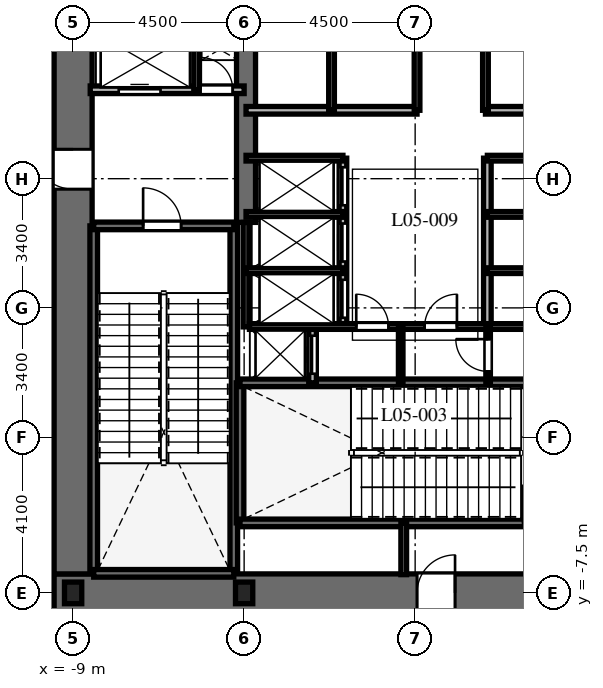
"""IFC4 building model, lengths in metres.
Left out: names, types, materials, properties, quantities, classifications, styles, units other than length and angle.
Written with IfcOpenShell. Run it as: python <this file> out.ifc"""

import sys

from ifc_helpers import new_model, si_unit, direction, frame, frame_2d, origin, origin_2d, place, context, subcontext, project, spatial, rectangle, i_section, extrude, element, fill, save


model = new_model("IFC4")
c1 = context("Model", 3, precision=1e-05, world=origin(), true_north=direction((0.0, 1.0)))
c2 = subcontext(c1, "Body", "Model", "MODEL_VIEW")
j1 = project(units=[si_unit("LENGTHUNIT", "METRE"), si_unit("PLANEANGLEUNIT", "RADIAN")], contexts=[c1])
p1 = place(None, origin())
s1 = spatial("IfcSite", under=j1, at=p1, CompositionType="ELEMENT")
p2 = place(p1, origin())
s2 = spatial("IfcBuilding", under=s1, at=p2, CompositionType="ELEMENT")
p3 = place(p2, frame((0.0, 0.0, 28.2)))
s3 = spatial("IfcBuildingStorey", under=s2, at=p3, CompositionType="ELEMENT", Elevation=28.2)
p4 = place(p3, frame((-9.5, -7.5, 0.0), z_axis=(0.0, 0.0, 1.0), x_axis=(1.0, 0.0, 0.0)))
e1 = element("IfcWall", 1, at=p4, inside=s3, PredefinedType="SHEAR", context=c2, shape_type="SweptSolid", body=[
    extrude(rectangle(XDim=19.0, YDim=1.0, at=frame_2d((9.5, 0.0))), origin(), (0.0, 0.0, 1.0), 6.0),
])
p5 = place(p4, frame((9.55, 0.0, 0.0)))
e2 = element("IfcOpeningElement", 2, at=p5, cuts=e1, PredefinedType="OPENING", context=c2, shape_type="SweptSolid", body=[
    extrude(rectangle(XDim=1.0, YDim=2.15, at=frame_2d((0.5, 1.075))), frame((0.0, 0.51, 0.0), z_axis=(0.0, -1.0, 0.0), x_axis=(1.0, 0.0, 0.0)), (0.0, 0.0, 1.0), 1.02),
])
p6 = place(p3, frame((-9.0, -7.0, 0.0), z_axis=(0.0, 0.0, 1.0), x_axis=(0.0, 1.0, 0.0)))
e3 = element("IfcWall", 3, at=p6, inside=s3, PredefinedType="SHEAR", context=c2, shape_type="SweptSolid", body=[
    extrude(rectangle(XDim=14.0, YDim=1.0, at=frame_2d((7.0, 0.0))), origin(), (0.0, 0.0, 1.0), 6.0),
])
p7 = place(p6, frame((10.125, 0.0, 0.0)))
e4 = element("IfcOpeningElement", 4, at=p7, cuts=e3, PredefinedType="OPENING", context=c2, shape_type="SweptSolid", body=[
    extrude(rectangle(XDim=1.05, YDim=2.15, at=frame_2d((0.525, 1.075))), frame((0.0, 0.51, 0.0), z_axis=(0.0, -1.0, 0.0), x_axis=(1.0, 0.0, 0.0)), (0.0, 0.0, 1.0), 1.02),
])
p8 = place(p3, frame((-4.45, 2.25, 0.0), z_axis=(0.0, 0.0, 1.0), x_axis=(0.0, 1.0, 0.0)))
e5 = element("IfcWall", 5, at=p8, inside=s3, PredefinedType="SHEAR", context=c2, shape_type="SweptSolid", body=[
    extrude(rectangle(XDim=4.75, YDim=0.5, at=frame_2d((2.375, 0.0))), origin(), (0.0, 0.0, 1.0), 6.0),
])
for number, where, z_axis, x_axis in (
    (6, (-8.458, -6.985, 0.0), (0.0, 0.0, 1.0), (0.0, 1.0, 0.0)),
    (7, (-4.772, -6.985, 0.0), (0.0, 0.0, 1.0), (0.0, 1.0, 0.0)),
):
    element("IfcWall", number, at=place(p3, frame(where, z_axis=z_axis, x_axis=x_axis)), inside=s3, PredefinedType="SHEAR", context=c2, shape_type="SweptSolid", body=[
        extrude(rectangle(XDim=9.143, YDim=0.2, at=frame_2d((4.572, 0.0))), origin(), (0.0, 0.0, 1.0), 6.0),
    ])
p9 = place(p3, frame((-8.458, -6.985, 0.0), z_axis=(0.0, 0.0, 1.0), x_axis=(1.0, 0.0, 0.0)))
e8 = element("IfcWall", 8, at=p9, inside=s3, PredefinedType="SHEAR", context=c2, shape_type="SweptSolid", body=[
    extrude(rectangle(XDim=3.686, YDim=0.2, at=frame_2d((1.843, 0.0))), origin(), (0.0, 0.0, 1.0), 6.0),
])
p10 = place(p3, frame((-8.458, 2.158, 0.0), z_axis=(0.0, 0.0, 1.0), x_axis=(1.0, 0.0, 0.0)))
e9 = element("IfcWall", 9, at=p10, inside=s3, PredefinedType="SHEAR", context=c2, shape_type="SweptSolid", body=[
    extrude(rectangle(XDim=3.686, YDim=0.2, at=frame_2d((1.843, 0.0))), origin(), (0.0, 0.0, 1.0), 6.0),
])
p11 = place(p10, frame((1.3, 0.0, 0.0)))
e10 = element("IfcOpeningElement", 10, at=p11, cuts=e9, PredefinedType="OPENING", context=c2, shape_type="SweptSolid", body=[
    extrude(rectangle(XDim=1.0, YDim=2.15, at=frame_2d((0.5, 1.075))), frame((0.0, 0.11, 0.0), z_axis=(0.0, -1.0, 0.0), x_axis=(1.0, 0.0, 0.0)), (0.0, 0.0, 1.0), 0.22),
])
p12 = place(p3, frame((-4.608, -5.658, 0.0), z_axis=(0.0, 0.0, 1.0), x_axis=(0.0, 1.0, 0.0)))
e11 = element("IfcWall", 11, at=p12, inside=s3, PredefinedType="SHEAR", context=c2, shape_type="SweptSolid", body=[
    extrude(rectangle(XDim=3.686, YDim=0.2, at=frame_2d((1.843, 0.0))), origin(), (0.0, 0.0, 1.0), 6.0),
])
p13 = place(p3, frame((-4.608, -5.658, 0.0), z_axis=(0.0, 0.0, 1.0), x_axis=(1.0, 0.0, 0.0)))
e12 = element("IfcWall", 12, at=p13, inside=s3, PredefinedType="SHEAR", context=c2, shape_type="SweptSolid", body=[
    extrude(rectangle(XDim=9.166, YDim=0.2, at=frame_2d((4.583, 0.0))), origin(), (0.0, 0.0, 1.0), 6.0),
])
p14 = place(p13, frame((7.45, 0.0, 0.0)))
e13 = element("IfcOpeningElement", 13, at=p14, cuts=e12, PredefinedType="OPENING", context=c2, shape_type="SweptSolid", body=[
    extrude(rectangle(XDim=1.0, YDim=2.15, at=frame_2d((0.5, 1.075))), frame((0.0, 0.11, 0.0), z_axis=(0.0, -1.0, 0.0), x_axis=(1.0, 0.0, 0.0)), (0.0, 0.0, 1.0), 0.22),
])
p15 = place(p3, frame((-4.608, -1.972, 0.0), z_axis=(0.0, 0.0, 1.0), x_axis=(1.0, 0.0, 0.0)))
e14 = element("IfcWall", 14, at=p15, inside=s3, PredefinedType="SHEAR", context=c2, shape_type="SweptSolid", body=[
    extrude(rectangle(XDim=9.166, YDim=0.2, at=frame_2d((4.583, 0.0))), origin(), (0.0, 0.0, 1.0), 6.0),
])
for number, where, z_axis, x_axis in (
    (15, (-9.0, -7.5, 0.0), (0.0, 0.0, 1.0), (1.0, 0.0, 0.0)),
    (16, (-4.5, -7.5, 0.0), (0.0, 0.0, 1.0), (1.0, 0.0, 0.0)),
):
    element("IfcColumn", number, at=place(p3, frame(where, z_axis=z_axis, x_axis=x_axis)), inside=s3, PredefinedType="COLUMN", context=c2, shape_type="SweptSolid", body=[
        extrude(i_section(OverallWidth=0.454, OverallDepth=0.569, WebThickness=0.078, FlangeThickness=0.125, at=origin_2d()), origin(), (0.0, 0.0, 1.0), 6.0),
    ])
p16 = place(p3, frame((-0.3, -7.02, 0.0), z_axis=(0.0, 0.0, 1.0), x_axis=(0.0, 1.0, 0.0)))
e17 = element("IfcWall", 17, at=p16, inside=s3, PredefinedType="PARTITIONING", context=c2, shape_type="SweptSolid", body=[
    extrude(rectangle(XDim=1.362, YDim=0.15, at=frame_2d((0.681, 0.0))), origin(), (0.0, 0.0, 1.0), 5.7),
])
p17 = place(p3, frame((-8.55, 5.74, 0.0), z_axis=(0.0, 0.0, 1.0), x_axis=(1.0, 0.0, 0.0)))
e18 = element("IfcWall", 18, at=p17, inside=s3, PredefinedType="PARTITIONING", context=c2, shape_type="SweptSolid", body=[
    extrude(rectangle(XDim=4.05, YDim=0.2, at=frame_2d((2.025, 0.0))), origin(), (0.0, 0.0, 1.0), 5.7),
])
p18 = place(p17, frame((0.75, 0.0, 0.0)))
e19 = element("IfcOpeningElement", 19, at=p18, cuts=e18, PredefinedType="OPENING", context=c2, shape_type="SweptSolid", body=[
    extrude(rectangle(XDim=1.1, YDim=2.2, at=frame_2d((0.55, 1.1))), frame((0.0, 0.11, 0.0), z_axis=(0.0, -1.0, 0.0), x_axis=(1.0, 0.0, 0.0)), (0.0, 0.0, 1.0), 0.22),
])
p19 = place(p17, frame((2.9, 0.0, 0.0)))
e20 = element("IfcOpeningElement", 20, at=p19, cuts=e18, PredefinedType="OPENING", context=c2, shape_type="SweptSolid", body=[
    extrude(rectangle(XDim=0.85, YDim=2.03, at=frame_2d((0.425, 1.015))), frame((0.0, 0.11, 0.0), z_axis=(0.0, -1.0, 0.0), x_axis=(1.0, 0.0, 0.0)), (0.0, 0.0, 1.0), 0.22),
])
p20 = place(p3, frame((-5.75, 5.74, 0.0), z_axis=(0.0, 0.0, 1.0), x_axis=(0.0, 1.0, 0.0)))
e21 = element("IfcWall", 21, at=p20, inside=s3, PredefinedType="PARTITIONING", context=c2, shape_type="SweptSolid", body=[
    extrude(rectangle(XDim=1.41, YDim=0.15, at=frame_2d((0.705, 0.0))), origin(), (0.0, 0.0, 1.0), 5.7),
])
p21 = place(p3, frame((-2.7, -1.972, 0.0), z_axis=(0.0, 0.0, 1.0), x_axis=(0.0, 1.0, 0.0)))
e22 = element("IfcWall", 22, at=p21, inside=s3, PredefinedType="PARTITIONING", context=c2, shape_type="SweptSolid", body=[
    extrude(rectangle(XDim=1.472, YDim=0.2, at=frame_2d((0.736, 0.0))), origin(), (0.0, 0.0, 1.0), 5.7),
])
p22 = place(p21, frame((0.24, 0.0, 0.0)))
e23 = element("IfcOpeningElement", 23, at=p22, cuts=e22, PredefinedType="OPENING", context=c2, shape_type="SweptSolid", body=[
    extrude(rectangle(XDim=1.0, YDim=2.2, at=frame_2d((0.5, 1.1))), frame((0.0, 0.11, 0.0), z_axis=(0.0, -1.0, 0.0), x_axis=(1.0, 0.0, 0.0)), (0.0, 0.0, 1.0), 0.22),
])
p23 = place(p3, frame((-4.45, 5.2, 0.0), z_axis=(0.0, 0.0, 1.0), x_axis=(1.0, 0.0, 0.0)))
e24 = element("IfcWall", 24, at=p23, inside=s3, PredefinedType="PARTITIONING", context=c2, shape_type="SweptSolid", body=[
    extrude(rectangle(XDim=4.5, YDim=0.2, at=frame_2d((2.25, 0.0))), origin(), (0.0, 0.0, 1.0), 5.7),
])
p24 = place(p3, frame((1.85, 5.2, 0.0), z_axis=(0.0, 0.0, 1.0), x_axis=(1.0, 0.0, 0.0)))
e25 = element("IfcWall", 25, at=p24, inside=s3, PredefinedType="PARTITIONING", context=c2, shape_type="SweptSolid", body=[
    extrude(rectangle(XDim=2.6, YDim=0.2, at=frame_2d((1.3, 0.0))), origin(), (0.0, 0.0, 1.0), 5.7),
])
p25 = place(p3, frame((-2.2, 5.2, 0.0), z_axis=(0.0, 0.0, 1.0), x_axis=(0.0, 1.0, 0.0)))
e26 = element("IfcWall", 26, at=p25, inside=s3, PredefinedType="PARTITIONING", context=c2, shape_type="SweptSolid", body=[
    extrude(rectangle(XDim=1.85, YDim=0.15, at=frame_2d((0.925, 0.0))), origin(), (0.0, 0.0, 1.0), 5.7),
])
for number, where, z_axis, x_axis in (
    (27, (0.05, 5.2, 0.0), (0.0, 0.0, 1.0), (0.0, 1.0, 0.0)),
    (28, (1.85, 5.2, 0.0), (0.0, 0.0, 1.0), (0.0, 1.0, 0.0)),
):
    element("IfcWall", number, at=place(p3, frame(where, z_axis=z_axis, x_axis=x_axis)), inside=s3, PredefinedType="PARTITIONING", context=c2, shape_type="SweptSolid", body=[
        extrude(rectangle(XDim=1.95, YDim=0.15, at=frame_2d((0.975, 0.0))), origin(), (0.0, 0.0, 1.0), 5.7),
    ])
p26 = place(p3, frame((-4.45, -0.5, 0.0), z_axis=(0.0, 0.0, 1.0), x_axis=(0.0, 1.0, 0.0)))
e29 = element("IfcWall", 29, at=p26, inside=s3, PredefinedType="PARTITIONING", context=c2, shape_type="SweptSolid", body=[
    extrude(rectangle(XDim=2.75, YDim=0.15, at=frame_2d((1.375, 0.0))), origin(), (0.0, 0.0, 1.0), 5.7),
])
p27 = place(p3, frame((-1.9, -0.5, 0.0), z_axis=(0.0, 0.0, 1.0), x_axis=(0.0, 1.0, 0.0)))
e30 = element("IfcWall", 30, at=p27, inside=s3, PredefinedType="PARTITIONING", context=c2, shape_type="SweptSolid", body=[
    extrude(rectangle(XDim=4.44, YDim=0.2, at=frame_2d((2.22, 0.0))), origin(), (0.0, 0.0, 1.0), 5.7),
])
p28 = place(p27, frame((0.24, 0.0, 0.0)))
e31 = element("IfcOpeningElement", 31, at=p28, cuts=e30, PredefinedType="OPENING", context=c2, shape_type="SweptSolid", body=[
    extrude(rectangle(XDim=1.0, YDim=2.2, at=frame_2d((0.5, 1.1))), frame((0.0, 0.11, 0.0), z_axis=(0.0, -1.0, 0.0), x_axis=(1.0, 0.0, 0.0)), (0.0, 0.0, 1.0), 0.22),
])
p29 = place(p27, frame((1.72, 0.0, 0.0)))
e32 = element("IfcOpeningElement", 32, at=p29, cuts=e30, PredefinedType="OPENING", context=c2, shape_type="SweptSolid", body=[
    extrude(rectangle(XDim=1.0, YDim=2.2, at=frame_2d((0.5, 1.1))), frame((0.0, 0.11, 0.0), z_axis=(0.0, -1.0, 0.0), x_axis=(1.0, 0.0, 0.0)), (0.0, 0.0, 1.0), 0.22),
])
p30 = place(p27, frame((3.2, 0.0, 0.0)))
e33 = element("IfcOpeningElement", 33, at=p30, cuts=e30, PredefinedType="OPENING", context=c2, shape_type="SweptSolid", body=[
    extrude(rectangle(XDim=1.0, YDim=2.2, at=frame_2d((0.5, 1.1))), frame((0.0, 0.11, 0.0), z_axis=(0.0, -1.0, 0.0), x_axis=(1.0, 0.0, 0.0)), (0.0, 0.0, 1.0), 0.22),
])
for number, where, z_axis, x_axis in (
    (34, (-4.45, 3.94, 0.0), (0.0, 0.0, 1.0), (1.0, 0.0, 0.0)),
    (35, (-4.45, 0.98, 0.0), (0.0, 0.0, 1.0), (1.0, 0.0, 0.0)),
    (36, (-4.45, 2.46, 0.0), (0.0, 0.0, 1.0), (1.0, 0.0, 0.0)),
):
    element("IfcWall", number, at=place(p3, frame(where, z_axis=z_axis, x_axis=x_axis)), inside=s3, PredefinedType="PARTITIONING", context=c2, shape_type="SweptSolid", body=[
        extrude(rectangle(XDim=2.55, YDim=0.15, at=frame_2d((1.275, 0.0))), origin(), (0.0, 0.0, 1.0), 5.7),
    ])
p31 = place(p3, frame((1.9, -0.5, 0.0), z_axis=(0.0, 0.0, 1.0), x_axis=(0.0, 1.0, 0.0)))
e37 = element("IfcWall", 37, at=p31, inside=s3, PredefinedType="PARTITIONING", context=c2, shape_type="SweptSolid", body=[
    extrude(rectangle(XDim=4.44, YDim=0.2, at=frame_2d((2.22, 0.0))), origin(), (0.0, 0.0, 1.0), 5.7),
])
for number, where, z_axis, x_axis in (
    (38, (1.9, 3.94, 0.0), (0.0, 0.0, 1.0), (1.0, 0.0, 0.0)),
    (39, (1.9, 0.98, 0.0), (0.0, 0.0, 1.0), (1.0, 0.0, 0.0)),
    (40, (1.9, 2.46, 0.0), (0.0, 0.0, 1.0), (1.0, 0.0, 0.0)),
):
    element("IfcWall", number, at=place(p3, frame(where, z_axis=z_axis, x_axis=x_axis)), inside=s3, PredefinedType="PARTITIONING", context=c2, shape_type="SweptSolid", body=[
        extrude(rectangle(XDim=2.55, YDim=0.15, at=frame_2d((1.275, 0.0))), origin(), (0.0, 0.0, 1.0), 5.7),
    ])
p32 = place(p3, frame((-4.36, -0.49, 0.0), z_axis=(0.0, 0.0, 1.0), x_axis=(1.0, 0.0, 0.0)))
e41 = element("IfcWall", 41, at=p32, inside=s3, PredefinedType="PARTITIONING", context=c2, shape_type="SweptSolid", body=[
    extrude(rectangle(XDim=8.72, YDim=0.15, at=frame_2d((4.36, 0.0))), origin(), (0.0, 0.0, 1.0), 5.7),
])
p33 = place(p32, frame((2.81, 0.0, 0.0)))
e42 = element("IfcOpeningElement", 42, at=p33, cuts=e41, PredefinedType="OPENING", context=c2, shape_type="SweptSolid", body=[
    extrude(rectangle(XDim=0.85, YDim=2.03, at=frame_2d((0.425, 1.015))), frame((0.0, 0.085, 0.0), z_axis=(0.0, -1.0, 0.0), x_axis=(1.0, 0.0, 0.0)), (0.0, 0.0, 1.0), 0.17),
])
p34 = place(p32, frame((4.61, 0.0, 0.0)))
e43 = element("IfcOpeningElement", 43, at=p34, cuts=e41, PredefinedType="OPENING", context=c2, shape_type="SweptSolid", body=[
    extrude(rectangle(XDim=0.85, YDim=2.03, at=frame_2d((0.425, 1.015))), frame((0.0, 0.085, 0.0), z_axis=(0.0, -1.0, 0.0), x_axis=(1.0, 0.0, 0.0)), (0.0, 0.0, 1.0), 0.17),
])
p35 = place(p3, frame((-0.38, -1.972, 0.0), z_axis=(0.0, 0.0, 1.0), x_axis=(0.0, 1.0, 0.0)))
e44 = element("IfcWall", 44, at=p35, inside=s3, PredefinedType="PARTITIONING", context=c2, shape_type="SweptSolid", body=[
    extrude(rectangle(XDim=1.472, YDim=0.12, at=frame_2d((0.736, 0.0))), origin(), (0.0, 0.0, 1.0), 5.7),
])
p36 = place(p3, frame((1.92, -1.972, 0.0), z_axis=(0.0, 0.0, 1.0), x_axis=(0.0, 1.0, 0.0)))
e45 = element("IfcWall", 45, at=p36, inside=s3, PredefinedType="PARTITIONING", context=c2, shape_type="SweptSolid", body=[
    extrude(rectangle(XDim=1.472, YDim=0.12, at=frame_2d((0.736, 0.0))), origin(), (0.0, 0.0, 1.0), 5.7),
])
p37 = place(p36, frame((0.3, 0.0, 0.0)))
e46 = element("IfcOpeningElement", 46, at=p37, cuts=e45, PredefinedType="OPENING", context=c2, shape_type="SweptSolid", body=[
    extrude(rectangle(XDim=0.85, YDim=2.03, at=frame_2d((0.425, 1.015))), frame((0.0, 0.07, 0.0), z_axis=(0.0, -1.0, 0.0), x_axis=(1.0, 0.0, 0.0)), (0.0, 0.0, 1.0), 0.14),
])
p38 = place(p11, origin())
e47 = element("IfcDoor", 47, at=p38, inside=s3, OperationType="SINGLE_SWING_LEFT", PredefinedType="DOOR", context=c2, shape_type="SweptSolid", body=[
    extrude(rectangle(XDim=1.0, YDim=2.15, at=frame_2d((0.5, 1.075))), frame((0.0, 0.025, 0.0), z_axis=(0.0, -1.0, 0.0), x_axis=(1.0, 0.0, 0.0)), (0.0, 0.0, 1.0), 0.05),
])
fill(e10, e47)
p39 = place(p14, origin())
e48 = element("IfcDoor", 48, at=p39, inside=s3, OperationType="SINGLE_SWING_LEFT", PredefinedType="DOOR", context=c2, shape_type="SweptSolid", body=[
    extrude(rectangle(XDim=1.0, YDim=2.15, at=frame_2d((0.5, 1.075))), frame((0.0, 0.025, 0.0), z_axis=(0.0, -1.0, 0.0), x_axis=(1.0, 0.0, 0.0)), (0.0, 0.0, 1.0), 0.05),
])
fill(e13, e48)
p40 = place(p5, origin())
e49 = element("IfcDoor", 49, at=p40, inside=s3, OperationType="SINGLE_SWING_RIGHT", PredefinedType="DOOR", context=c2, shape_type="SweptSolid", body=[
    extrude(rectangle(XDim=1.0, YDim=2.15, at=frame_2d((0.5, 1.075))), frame((0.0, 0.025, 0.0), z_axis=(0.0, -1.0, 0.0), x_axis=(1.0, 0.0, 0.0)), (0.0, 0.0, 1.0), 0.05),
])
fill(e2, e49)
p41 = place(p7, origin())
e50 = element("IfcDoor", 50, at=p41, inside=s3, OperationType="SINGLE_SWING_RIGHT", PredefinedType="DOOR", context=c2, shape_type="SweptSolid", body=[
    extrude(rectangle(XDim=1.05, YDim=2.15, at=frame_2d((0.525, 1.075))), frame((0.0, 0.025, 0.0), z_axis=(0.0, -1.0, 0.0), x_axis=(1.0, 0.0, 0.0)), (0.0, 0.0, 1.0), 0.05),
])
fill(e4, e50)
p42 = place(p18, origin())
e51 = element("IfcDoor", 51, at=p42, inside=s3, OperationType="SLIDING_TO_LEFT", PredefinedType="DOOR", context=c2, shape_type="SweptSolid", body=[
    extrude(rectangle(XDim=1.1, YDim=2.2, at=frame_2d((0.55, 1.1))), frame((0.0, 0.025, 0.0), z_axis=(0.0, -1.0, 0.0), x_axis=(1.0, 0.0, 0.0)), (0.0, 0.0, 1.0), 0.05),
])
fill(e19, e51)
p43 = place(p19, origin())
e52 = element("IfcDoor", 52, at=p43, inside=s3, OperationType="SINGLE_SWING_LEFT", PredefinedType="DOOR", context=c2, shape_type="SweptSolid", body=[
    extrude(rectangle(XDim=0.85, YDim=2.03, at=frame_2d((0.425, 1.015))), frame((0.0, 0.025, 0.0), z_axis=(0.0, -1.0, 0.0), x_axis=(1.0, 0.0, 0.0)), (0.0, 0.0, 1.0), 0.05),
])
fill(e20, e52)
p44 = place(p22, origin())
e53 = element("IfcDoor", 53, at=p44, inside=s3, OperationType="SLIDING_TO_LEFT", PredefinedType="DOOR", context=c2, shape_type="SweptSolid", body=[
    extrude(rectangle(XDim=1.0, YDim=2.2, at=frame_2d((0.5, 1.1))), frame((0.0, 0.025, 0.0), z_axis=(0.0, -1.0, 0.0), x_axis=(1.0, 0.0, 0.0)), (0.0, 0.0, 1.0), 0.05),
])
fill(e23, e53)
p45 = place(p28, origin())
e54 = element("IfcDoor", 54, at=p45, inside=s3, OperationType="SLIDING_TO_LEFT", PredefinedType="DOOR", context=c2, shape_type="SweptSolid", body=[
    extrude(rectangle(XDim=1.0, YDim=2.2, at=frame_2d((0.5, 1.1))), frame((0.0, 0.025, 0.0), z_axis=(0.0, -1.0, 0.0), x_axis=(1.0, 0.0, 0.0)), (0.0, 0.0, 1.0), 0.05),
])
fill(e31, e54)
p46 = place(p29, origin())
e55 = element("IfcDoor", 55, at=p46, inside=s3, OperationType="SLIDING_TO_LEFT", PredefinedType="DOOR", context=c2, shape_type="SweptSolid", body=[
    extrude(rectangle(XDim=1.0, YDim=2.2, at=frame_2d((0.5, 1.1))), frame((0.0, 0.025, 0.0), z_axis=(0.0, -1.0, 0.0), x_axis=(1.0, 0.0, 0.0)), (0.0, 0.0, 1.0), 0.05),
])
fill(e32, e55)
p47 = place(p30, origin())
e56 = element("IfcDoor", 56, at=p47, inside=s3, OperationType="SLIDING_TO_LEFT", PredefinedType="DOOR", context=c2, shape_type="SweptSolid", body=[
    extrude(rectangle(XDim=1.0, YDim=2.2, at=frame_2d((0.5, 1.1))), frame((0.0, 0.025, 0.0), z_axis=(0.0, -1.0, 0.0), x_axis=(1.0, 0.0, 0.0)), (0.0, 0.0, 1.0), 0.05),
])
fill(e33, e56)
p48 = place(p33, origin())
e57 = element("IfcDoor", 57, at=p48, inside=s3, OperationType="SINGLE_SWING_LEFT", PredefinedType="DOOR", context=c2, shape_type="SweptSolid", body=[
    extrude(rectangle(XDim=0.85, YDim=2.03, at=frame_2d((0.425, 1.015))), frame((0.0, 0.025, 0.0), z_axis=(0.0, -1.0, 0.0), x_axis=(1.0, 0.0, 0.0)), (0.0, 0.0, 1.0), 0.05),
])
fill(e42, e57)
p49 = place(p34, origin())
e58 = element("IfcDoor", 58, at=p49, inside=s3, OperationType="SINGLE_SWING_RIGHT", PredefinedType="DOOR", context=c2, shape_type="SweptSolid", body=[
    extrude(rectangle(XDim=0.85, YDim=2.03, at=frame_2d((0.425, 1.015))), frame((0.0, 0.025, 0.0), z_axis=(0.0, -1.0, 0.0), x_axis=(1.0, 0.0, 0.0)), (0.0, 0.0, 1.0), 0.05),
])
fill(e43, e58)
p50 = place(p37, origin())
e59 = element("IfcDoor", 59, at=p50, inside=s3, OperationType="SINGLE_SWING_RIGHT", PredefinedType="DOOR", context=c2, shape_type="SweptSolid", body=[
    extrude(rectangle(XDim=0.85, YDim=2.03, at=frame_2d((0.425, 1.015))), frame((0.0, 0.025, 0.0), z_axis=(0.0, -1.0, 0.0), x_axis=(1.0, 0.0, 0.0)), (0.0, 0.0, 1.0), 0.05),
])
fill(e46, e59)
save(model, sys.argv[1])
